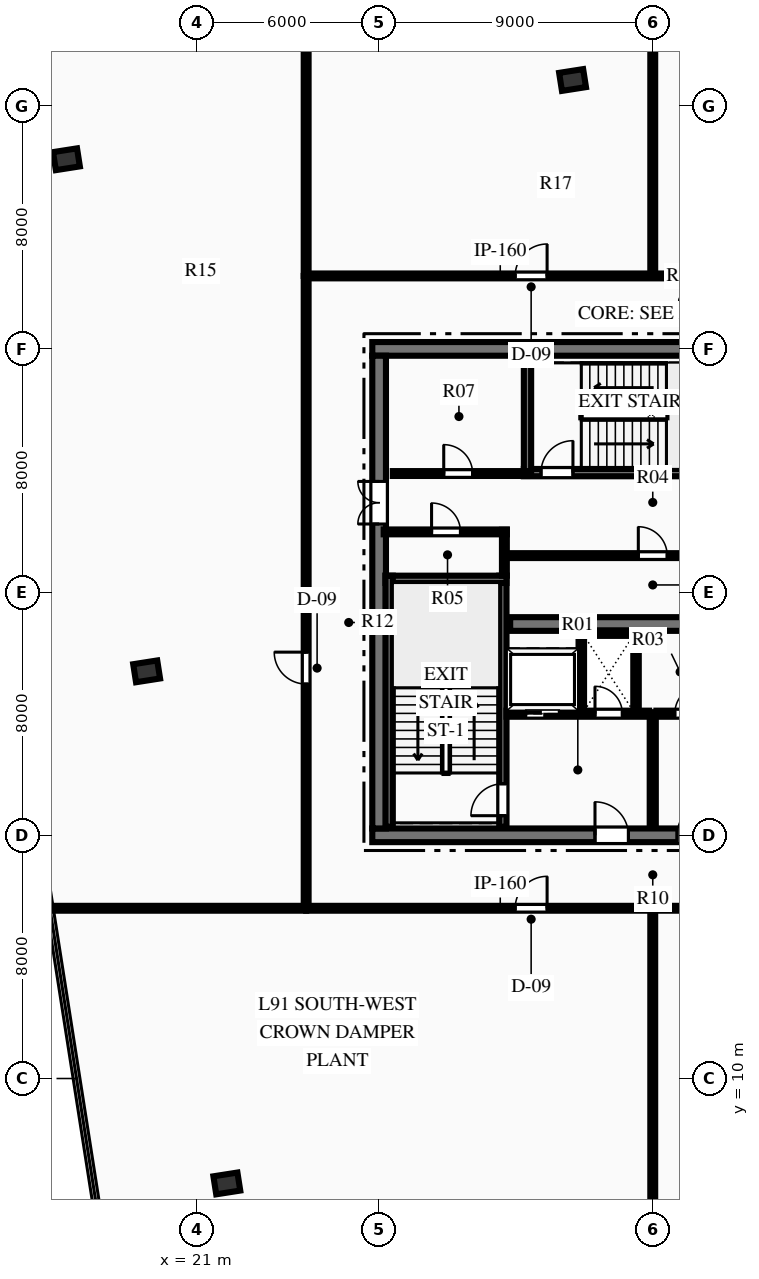
"""IFC4 building model, lengths in metres.
Left out: names, types, materials, properties, quantities, classifications, styles, units other than length and angle.
Written with IfcOpenShell. Run it as: python <this file> out.ifc"""

import sys

from ifc_helpers import new_model, si_unit, direction, frame, frame_2d, origin, origin_2d, place, context, subcontext, project, spatial, rectangle, hollow_rectangle, extrude, element, fill, save


model = new_model("IFC4")
c1 = context("Model", 3, precision=1e-05, world=origin(), true_north=direction((0.0, 1.0)))
c2 = subcontext(c1, "Body", "Model", "MODEL_VIEW")
j1 = project(units=[si_unit("LENGTHUNIT", "METRE"), si_unit("PLANEANGLEUNIT", "RADIAN")], contexts=[c1])
p1 = place(None, origin())
s1 = spatial("IfcSite", under=j1, at=p1, CompositionType="ELEMENT")
p2 = place(p1, origin())
s2 = spatial("IfcBuilding", under=s1, at=p2, CompositionType="ELEMENT")
p3 = place(p2, frame((0.0, 0.0, 360.6)))
s3 = spatial("IfcBuildingStorey", under=s2, at=p3, CompositionType="ELEMENT", Elevation=360.6)
p4 = place(p3, frame((26.775, 18.0, 0.0), z_axis=(0.0, 0.0, 1.0), x_axis=(1.0, 0.0, 0.0)))
e1 = element("IfcWall", 1, at=p4, inside=s3, PredefinedType="SHEAR", context=c2, shape_type="SweptSolid", body=[
    extrude(rectangle(XDim=18.45, YDim=0.45, at=frame_2d((9.225, 0.0))), origin(), (0.0, 0.0, 1.0), 3.6),
])
p5 = place(p4, frame((7.325, 0.0, 0.0)))
e2 = element("IfcOpeningElement", 2, at=p5, cuts=e1, PredefinedType="OPENING", context=c2, shape_type="SweptSolid", body=[
    extrude(rectangle(XDim=1.1, YDim=2.15, at=frame_2d((0.55, 1.075))), frame((0.0, 0.235, 0.0), z_axis=(0.0, -1.0, 0.0), x_axis=(1.0, 0.0, 0.0)), (0.0, 0.0, 1.0), 0.47),
])
p6 = place(p4, frame((10.025, 0.0, 0.0)))
e3 = element("IfcOpeningElement", 3, at=p6, cuts=e1, PredefinedType="OPENING", context=c2, shape_type="SweptSolid", body=[
    extrude(rectangle(XDim=1.1, YDim=2.15, at=frame_2d((0.55, 1.075))), frame((0.0, 0.235, 0.0), z_axis=(0.0, -1.0, 0.0), x_axis=(1.0, 0.0, 0.0)), (0.0, 0.0, 1.0), 0.47),
])
p7 = place(p3, frame((26.775, 34.0, 0.0), z_axis=(0.0, 0.0, 1.0), x_axis=(1.0, 0.0, 0.0)))
e4 = element("IfcWall", 4, at=p7, inside=s3, PredefinedType="SHEAR", context=c2, shape_type="SweptSolid", body=[
    extrude(rectangle(XDim=18.45, YDim=0.45, at=frame_2d((9.225, 0.0))), origin(), (0.0, 0.0, 1.0), 3.6),
])
p8 = place(p3, frame((27.0, 18.225, 0.0), z_axis=(0.0, 0.0, 1.0), x_axis=(0.0, 1.0, 0.0)))
e5 = element("IfcWall", 5, at=p8, inside=s3, PredefinedType="SHEAR", context=c2, shape_type="SweptSolid", body=[
    extrude(rectangle(XDim=15.55, YDim=0.45, at=frame_2d((7.775, 0.0))), origin(), (0.0, 0.0, 1.0), 3.6),
])
p9 = place(p8, frame((10.015, 0.0, 0.0)))
e6 = element("IfcOpeningElement", 6, at=p9, cuts=e5, PredefinedType="OPENING", context=c2, shape_type="SweptSolid", body=[
    extrude(rectangle(XDim=1.4, YDim=2.2, at=frame_2d((0.7, 1.1))), frame((0.0, 0.235, 0.0), z_axis=(0.0, -1.0, 0.0), x_axis=(1.0, 0.0, 0.0)), (0.0, 0.0, 1.0), 0.47),
])
p10 = place(p3, frame((31.31, 24.95, 0.0), z_axis=(0.0, 0.0, 1.0), x_axis=(1.0, 0.0, 0.0)))
e7 = element("IfcWall", 7, at=p10, inside=s3, PredefinedType="SHEAR", context=c2, shape_type="SweptSolid", body=[
    extrude(rectangle(XDim=9.38, YDim=0.45, at=frame_2d((4.69, 0.0))), origin(), (0.0, 0.0, 1.0), 3.6),
])
p11 = place(p3, frame((31.07, 18.28, 0.0), z_axis=(0.0, 0.0, 1.0), x_axis=(0.0, 1.0, 0.0)))
e8 = element("IfcWall", 8, at=p11, inside=s3, PredefinedType="SHEAR", context=c2, shape_type="SweptSolid", body=[
    extrude(rectangle(XDim=8.26, YDim=0.24, at=frame_2d((4.13, 0.0))), origin(), (0.0, 0.0, 1.0), 3.6),
])
p12 = place(p11, frame((0.365, 0.0, 0.0)))
e9 = element("IfcOpeningElement", 9, at=p12, cuts=e8, PredefinedType="OPENING", context=c2, shape_type="SweptSolid", body=[
    extrude(rectangle(XDim=1.05, YDim=2.15, at=frame_2d((0.525, 1.075))), frame((0.0, 0.13, 0.0), z_axis=(0.0, -1.0, 0.0), x_axis=(1.0, 0.0, 0.0)), (0.0, 0.0, 1.0), 0.26),
])
p13 = place(p3, frame((27.21, 26.42, 0.0), z_axis=(0.0, 0.0, 1.0), x_axis=(1.0, 0.0, 0.0)))
e10 = element("IfcWall", 10, at=p13, inside=s3, PredefinedType="SHEAR", context=c2, shape_type="SweptSolid", body=[
    extrude(rectangle(XDim=3.98, YDim=0.24, at=frame_2d((1.99, 0.0))), origin(), (0.0, 0.0, 1.0), 3.6),
])
p14 = place(p3, frame((27.33, 18.28, 0.0), z_axis=(0.0, 0.0, 1.0), x_axis=(0.0, 1.0, 0.0)))
e11 = element("IfcWall", 11, at=p14, inside=s3, PredefinedType="SHEAR", context=c2, shape_type="SweptSolid", body=[
    extrude(rectangle(XDim=8.26, YDim=0.24, at=frame_2d((4.13, 0.0))), origin(), (0.0, 0.0, 1.0), 3.6),
])
p15 = place(p3, frame((31.76, 29.93, 0.0), z_axis=(0.0, 0.0, 1.0), x_axis=(1.0, 0.0, 0.0)))
e12 = element("IfcWall", 12, at=p15, inside=s3, PredefinedType="SHEAR", context=c2, shape_type="SweptSolid", body=[
    extrude(rectangle(XDim=8.38, YDim=0.24, at=frame_2d((4.19, 0.0))), origin(), (0.0, 0.0, 1.0), 3.6),
])
p16 = place(p15, frame((0.565, 0.0, 0.0)))
e13 = element("IfcOpeningElement", 13, at=p16, cuts=e12, PredefinedType="OPENING", context=c2, shape_type="SweptSolid", body=[
    extrude(rectangle(XDim=1.05, YDim=2.15, at=frame_2d((0.525, 1.075))), frame((0.0, 0.13, 0.0), z_axis=(0.0, -1.0, 0.0), x_axis=(1.0, 0.0, 0.0)), (0.0, 0.0, 1.0), 0.26),
])
p17 = place(p3, frame((31.88, 29.93, 0.0), z_axis=(0.0, 0.0, 1.0), x_axis=(0.0, 1.0, 0.0)))
e14 = element("IfcWall", 14, at=p17, inside=s3, PredefinedType="SHEAR", context=c2, shape_type="SweptSolid", body=[
    extrude(rectangle(XDim=3.79, YDim=0.24, at=frame_2d((1.895, 0.0))), origin(), (0.0, 0.0, 1.0), 3.6),
])
for number, where, z_axis, x_axis in (
    (15, (33.362, 42.845, 0.0), (0.0, 0.0, 1.0), (-0.155, 0.988, 0.0)),
    (16, (16.715, 40.238, 0.0), (0.0, 0.0, 1.0), (-0.155, 0.988, 0.0)),
    (17, (19.353, 23.393, 0.0), (0.0, 0.0, 1.0), (-0.155, 0.988, 0.0)),
    (18, (21.991, 6.548, 0.0), (0.0, 0.0, 1.0), (-0.155, 0.988, 0.0)),
):
    element("IfcColumn", number, at=place(p3, frame(where, z_axis=z_axis, x_axis=x_axis)), inside=s3, PredefinedType="COLUMN", context=c2, shape_type="SweptSolid", body=[
        extrude(hollow_rectangle(XDim=0.6, YDim=0.8, WallThickness=0.04, at=origin_2d()), origin(), (0.0, 0.0, 1.0), 3.6),
    ])
p18 = place(p3, frame((36.0, 18.28, 0.0), z_axis=(0.0, 0.0, 1.0), x_axis=(0.0, 1.0, 0.0)))
e19 = element("IfcWall", 19, at=p18, inside=s3, PredefinedType="PARTITIONING", context=c2, shape_type="SweptSolid", body=[
    extrude(rectangle(XDim=3.77, YDim=0.2, at=frame_2d((1.885, 0.0))), origin(), (0.0, 0.0, 1.0), 3.33),
])
p19 = place(p3, frame((31.19, 22.0, 0.0), z_axis=(0.0, 0.0, 1.0), x_axis=(1.0, 0.0, 0.0)))
e20 = element("IfcWall", 20, at=p19, inside=s3, PredefinedType="PARTITIONING", context=c2, shape_type="SweptSolid", body=[
    extrude(rectangle(XDim=4.69, YDim=0.2, at=frame_2d((2.345, 0.0))), origin(), (0.0, 0.0, 1.0), 3.33),
])
p20 = place(p19, frame((2.91, 0.0, 0.0)))
e21 = element("IfcOpeningElement", 21, at=p20, cuts=e20, PredefinedType="OPENING", context=c2, shape_type="SweptSolid", body=[
    extrude(rectangle(XDim=0.9, YDim=2.15, at=frame_2d((0.45, 1.075))), frame((0.0, 0.11, 0.0), z_axis=(0.0, -1.0, 0.0), x_axis=(1.0, 0.0, 0.0)), (0.0, 0.0, 1.0), 0.22),
])
p21 = place(p19, frame((0.635, 0.0, 0.0)))
e22 = element("IfcOpeningElement", 22, at=p21, cuts=e20, PredefinedType="OPENING", context=c2, shape_type="SweptSolid", body=[
    extrude(rectangle(XDim=1.1, YDim=2.15, at=frame_2d((0.55, 1.075))), frame((0.0, 0.11, 0.0), z_axis=(0.0, -1.0, 0.0), x_axis=(1.0, 0.0, 0.0)), (0.0, 0.0, 1.0), 0.22),
])
p22 = place(p3, frame((36.12, 22.0, 0.0), z_axis=(0.0, 0.0, 1.0), x_axis=(1.0, 0.0, 0.0)))
e23 = element("IfcWall", 23, at=p22, inside=s3, PredefinedType="PARTITIONING", context=c2, shape_type="SweptSolid", body=[
    extrude(rectangle(XDim=4.69, YDim=0.2, at=frame_2d((2.345, 0.0))), origin(), (0.0, 0.0, 1.0), 3.33),
])
p23 = place(p22, frame((0.605, 0.0, 0.0)))
e24 = element("IfcOpeningElement", 24, at=p23, cuts=e23, PredefinedType="OPENING", context=c2, shape_type="SweptSolid", body=[
    extrude(rectangle(XDim=0.95, YDim=2.15, at=frame_2d((0.475, 1.075))), frame((0.0, 0.11, 0.0), z_axis=(0.0, -1.0, 0.0), x_axis=(1.0, 0.0, 0.0)), (0.0, 0.0, 1.0), 0.22),
])
p24 = place(p22, frame((2.955, 0.0, 0.0)))
e25 = element("IfcOpeningElement", 25, at=p24, cuts=e23, PredefinedType="OPENING", context=c2, shape_type="SweptSolid", body=[
    extrude(rectangle(XDim=1.1, YDim=2.15, at=frame_2d((0.55, 1.075))), frame((0.0, 0.11, 0.0), z_axis=(0.0, -1.0, 0.0), x_axis=(1.0, 0.0, 0.0)), (0.0, 0.0, 1.0), 0.22),
])
for number, where, z_axis, x_axis in (
    (26, (33.65, 22.05, 0.0), (0.0, 0.0, 1.0), (0.0, 1.0, 0.0)),
    (27, (35.45, 22.05, 0.0), (0.0, 0.0, 1.0), (0.0, 1.0, 0.0)),
):
    element("IfcWall", number, at=place(p3, frame(where, z_axis=z_axis, x_axis=x_axis)), inside=s3, PredefinedType="PARTITIONING", context=c2, shape_type="SweptSolid", body=[
        extrude(rectangle(XDim=2.6, YDim=0.18, at=frame_2d((1.3, 0.0))), origin(), (0.0, 0.0, 1.0), 3.33),
    ])
p25 = place(p3, frame((33.65, 24.65, 0.0), z_axis=(0.0, 0.0, 1.0), x_axis=(1.0, 0.0, 0.0)))
e28 = element("IfcWall", 28, at=p25, inside=s3, PredefinedType="PARTITIONING", context=c2, shape_type="SweptSolid", body=[
    extrude(rectangle(XDim=1.8, YDim=0.18, at=frame_2d((0.9, 0.0))), origin(), (0.0, 0.0, 1.0), 3.33),
])
p26 = place(p3, frame((27.15, 27.98, 0.0), z_axis=(0.0, 0.0, 1.0), x_axis=(1.0, 0.0, 0.0)))
e29 = element("IfcWall", 29, at=p26, inside=s3, PredefinedType="PARTITIONING", context=c2, shape_type="SweptSolid", body=[
    extrude(rectangle(XDim=4.05, YDim=0.16, at=frame_2d((2.025, 0.0))), origin(), (0.0, 0.0, 1.0), 3.33),
])
p27 = place(p26, frame((1.575, 0.0, 0.0)))
e30 = element("IfcOpeningElement", 30, at=p27, cuts=e29, PredefinedType="OPENING", context=c2, shape_type="SweptSolid", body=[
    extrude(rectangle(XDim=0.95, YDim=2.15, at=frame_2d((0.475, 1.075))), frame((0.0, 0.09, 0.0), z_axis=(0.0, -1.0, 0.0), x_axis=(1.0, 0.0, 0.0)), (0.0, 0.0, 1.0), 0.18),
])
p28 = place(p3, frame((31.12, 26.54, 0.0), z_axis=(0.0, 0.0, 1.0), x_axis=(0.0, 1.0, 0.0)))
e31 = element("IfcWall", 31, at=p28, inside=s3, PredefinedType="PARTITIONING", context=c2, shape_type="SweptSolid", body=[
    extrude(rectangle(XDim=1.51, YDim=0.16, at=frame_2d((0.755, 0.0))), origin(), (0.0, 0.0, 1.0), 3.33),
])
p29 = place(p3, frame((27.45, 29.9, 0.0), z_axis=(0.0, 0.0, 1.0), x_axis=(1.0, 0.0, 0.0)))
e32 = element("IfcWall", 32, at=p29, inside=s3, PredefinedType="PARTITIONING", context=c2, shape_type="SweptSolid", body=[
    extrude(rectangle(XDim=4.43, YDim=0.16, at=frame_2d((2.215, 0.0))), origin(), (0.0, 0.0, 1.0), 3.33),
])
p30 = place(p29, frame((1.675, 0.0, 0.0)))
e33 = element("IfcOpeningElement", 33, at=p30, cuts=e32, PredefinedType="OPENING", context=c2, shape_type="SweptSolid", body=[
    extrude(rectangle(XDim=0.95, YDim=2.15, at=frame_2d((0.475, 1.075))), frame((0.0, 0.09, 0.0), z_axis=(0.0, -1.0, 0.0), x_axis=(1.0, 0.0, 0.0)), (0.0, 0.0, 1.0), 0.18),
])
p31 = place(p3, frame((31.2, 27.2, 0.0), z_axis=(0.0, 0.0, 1.0), x_axis=(1.0, 0.0, 0.0)))
e34 = element("IfcWall", 34, at=p31, inside=s3, PredefinedType="PARTITIONING", context=c2, shape_type="SweptSolid", body=[
    extrude(rectangle(XDim=9.6, YDim=0.16, at=frame_2d((4.8, 0.0))), origin(), (0.0, 0.0, 1.0), 3.33),
])
p32 = place(p31, frame((4.325, 0.0, 0.0)))
e35 = element("IfcOpeningElement", 35, at=p32, cuts=e34, PredefinedType="OPENING", context=c2, shape_type="SweptSolid", body=[
    extrude(rectangle(XDim=0.95, YDim=2.15, at=frame_2d((0.475, 1.075))), frame((0.0, 0.09, 0.0), z_axis=(0.0, -1.0, 0.0), x_axis=(1.0, 0.0, 0.0)), (0.0, 0.0, 1.0), 0.18),
])
p33 = place(p3, frame((24.6, 15.6, 0.0), z_axis=(0.0, 0.0, 1.0), x_axis=(1.0, 0.0, 0.0)))
e36 = element("IfcWall", 36, at=p33, inside=s3, PredefinedType="PARTITIONING", context=c2, shape_type="SweptSolid", body=[
    extrude(rectangle(XDim=22.8, YDim=0.16, at=frame_2d((11.4, 0.0))), origin(), (0.0, 0.0, 1.0), 3.33),
])
p34 = place(p33, frame((6.875, 0.0, 0.0)))
e37 = element("IfcOpeningElement", 37, at=p34, cuts=e36, PredefinedType="OPENING", context=c2, shape_type="SweptSolid", body=[
    extrude(rectangle(XDim=1.05, YDim=2.15, at=frame_2d((0.525, 1.075))), frame((0.0, 0.09, 0.0), z_axis=(0.0, -1.0, 0.0), x_axis=(1.0, 0.0, 0.0)), (0.0, 0.0, 1.0), 0.18),
])
p35 = place(p33, frame((14.875, 0.0, 0.0)))
e38 = element("IfcOpeningElement", 38, at=p35, cuts=e36, PredefinedType="OPENING", context=c2, shape_type="SweptSolid", body=[
    extrude(rectangle(XDim=1.05, YDim=2.15, at=frame_2d((0.525, 1.075))), frame((0.0, 0.09, 0.0), z_axis=(0.0, -1.0, 0.0), x_axis=(1.0, 0.0, 0.0)), (0.0, 0.0, 1.0), 0.18),
])
p36 = place(p3, frame((24.6, 36.4, 0.0), z_axis=(0.0, 0.0, 1.0), x_axis=(1.0, 0.0, 0.0)))
e39 = element("IfcWall", 39, at=p36, inside=s3, PredefinedType="PARTITIONING", context=c2, shape_type="SweptSolid", body=[
    extrude(rectangle(XDim=22.8, YDim=0.16, at=frame_2d((11.4, 0.0))), origin(), (0.0, 0.0, 1.0), 3.33),
])
p37 = place(p36, frame((6.875, 0.0, 0.0)))
e40 = element("IfcOpeningElement", 40, at=p37, cuts=e39, PredefinedType="OPENING", context=c2, shape_type="SweptSolid", body=[
    extrude(rectangle(XDim=1.05, YDim=2.15, at=frame_2d((0.525, 1.075))), frame((0.0, 0.09, 0.0), z_axis=(0.0, -1.0, 0.0), x_axis=(1.0, 0.0, 0.0)), (0.0, 0.0, 1.0), 0.18),
])
p38 = place(p36, frame((14.875, 0.0, 0.0)))
e41 = element("IfcOpeningElement", 41, at=p38, cuts=e39, PredefinedType="OPENING", context=c2, shape_type="SweptSolid", body=[
    extrude(rectangle(XDim=1.05, YDim=2.15, at=frame_2d((0.525, 1.075))), frame((0.0, 0.09, 0.0), z_axis=(0.0, -1.0, 0.0), x_axis=(1.0, 0.0, 0.0)), (0.0, 0.0, 1.0), 0.18),
])
p39 = place(p3, frame((24.6, 15.6, 0.0), z_axis=(0.0, 0.0, 1.0), x_axis=(0.0, 1.0, 0.0)))
e42 = element("IfcWall", 42, at=p39, inside=s3, PredefinedType="PARTITIONING", context=c2, shape_type="SweptSolid", body=[
    extrude(rectangle(XDim=20.8, YDim=0.16, at=frame_2d((10.4, 0.0))), origin(), (0.0, 0.0, 1.0), 3.33),
])
p40 = place(p39, frame((7.375, 0.0, 0.0)))
e43 = element("IfcOpeningElement", 43, at=p40, cuts=e42, PredefinedType="OPENING", context=c2, shape_type="SweptSolid", body=[
    extrude(rectangle(XDim=1.05, YDim=2.15, at=frame_2d((0.525, 1.075))), frame((0.0, 0.09, 0.0), z_axis=(0.0, -1.0, 0.0), x_axis=(1.0, 0.0, 0.0)), (0.0, 0.0, 1.0), 0.18),
])
for number, where, z_axis, x_axis in (
    (44, (36.0, 4.38, 0.0), (0.0, 0.0, 1.0), (0.0, 1.0, 0.0)),
    (45, (36.0, 36.4, 0.0), (0.0, 0.0, 1.0), (0.0, 1.0, 0.0)),
):
    element("IfcWall", number, at=place(p3, frame(where, z_axis=z_axis, x_axis=x_axis)), inside=s3, PredefinedType="PARTITIONING", context=c2, shape_type="SweptSolid", body=[
        extrude(rectangle(XDim=11.22, YDim=0.16, at=frame_2d((5.61, 0.0))), origin(), (0.0, 0.0, 1.0), 3.33),
    ])
p41 = place(p3, frame((16.211, 15.6, 0.0), z_axis=(0.0, 0.0, 1.0), x_axis=(1.0, 0.0, 0.0)))
e46 = element("IfcWall", 46, at=p41, inside=s3, PredefinedType="PARTITIONING", context=c2, shape_type="SweptSolid", body=[
    extrude(rectangle(XDim=8.389, YDim=0.16, at=frame_2d((4.195, 0.0))), origin(), (0.0, 0.0, 1.0), 3.33),
])
p42 = place(p3, frame((24.6, 36.4, 0.0), z_axis=(0.0, 0.0, 1.0), x_axis=(0.0, 1.0, 0.0)))
e47 = element("IfcWall", 47, at=p42, inside=s3, PredefinedType="PARTITIONING", context=c2, shape_type="SweptSolid", body=[
    extrude(rectangle(XDim=9.435, YDim=0.16, at=frame_2d((4.718, 0.0))), origin(), (0.0, 0.0, 1.0), 3.33),
])
p43 = place(p23, origin())
e48 = element("IfcDoor", 48, at=p43, inside=s3, OperationType="SINGLE_SWING_RIGHT", PredefinedType="DOOR", context=c2, shape_type="SweptSolid", body=[
    extrude(rectangle(XDim=0.95, YDim=2.15, at=frame_2d((0.475, 1.075))), frame((0.0, 0.025, 0.0), z_axis=(0.0, -1.0, 0.0), x_axis=(1.0, 0.0, 0.0)), (0.0, 0.0, 1.0), 0.05),
])
fill(e24, e48)
p44 = place(p27, origin())
e49 = element("IfcDoor", 49, at=p44, inside=s3, OperationType="SINGLE_SWING_LEFT", PredefinedType="DOOR", context=c2, shape_type="SweptSolid", body=[
    extrude(rectangle(XDim=0.95, YDim=2.15, at=frame_2d((0.475, 1.075))), frame((0.0, 0.025, 0.0), z_axis=(0.0, -1.0, 0.0), x_axis=(1.0, 0.0, 0.0)), (0.0, 0.0, 1.0), 0.05),
])
fill(e30, e49)
p45 = place(p30, origin())
e50 = element("IfcDoor", 50, at=p45, inside=s3, OperationType="SINGLE_SWING_LEFT", PredefinedType="DOOR", context=c2, shape_type="SweptSolid", body=[
    extrude(rectangle(XDim=0.95, YDim=2.15, at=frame_2d((0.475, 1.075))), frame((0.0, 0.025, 0.0), z_axis=(0.0, -1.0, 0.0), x_axis=(1.0, 0.0, 0.0)), (0.0, 0.0, 1.0), 0.05),
])
fill(e33, e50)
p46 = place(p32, origin())
e51 = element("IfcDoor", 51, at=p46, inside=s3, OperationType="SINGLE_SWING_LEFT", PredefinedType="DOOR", context=c2, shape_type="SweptSolid", body=[
    extrude(rectangle(XDim=0.95, YDim=2.15, at=frame_2d((0.475, 1.075))), frame((0.0, 0.025, 0.0), z_axis=(0.0, -1.0, 0.0), x_axis=(1.0, 0.0, 0.0)), (0.0, 0.0, 1.0), 0.05),
])
fill(e35, e51)
p47 = place(p12, origin())
e52 = element("IfcDoor", 52, at=p47, inside=s3, OperationType="SINGLE_SWING_LEFT", PredefinedType="DOOR", context=c2, shape_type="SweptSolid", body=[
    extrude(rectangle(XDim=1.05, YDim=2.15, at=frame_2d((0.525, 1.075))), frame((0.0, 0.025, 0.0), z_axis=(0.0, -1.0, 0.0), x_axis=(1.0, 0.0, 0.0)), (0.0, 0.0, 1.0), 0.05),
])
fill(e9, e52)
p48 = place(p16, origin())
e53 = element("IfcDoor", 53, at=p48, inside=s3, OperationType="SINGLE_SWING_RIGHT", PredefinedType="DOOR", context=c2, shape_type="SweptSolid", body=[
    extrude(rectangle(XDim=1.05, YDim=2.15, at=frame_2d((0.525, 1.075))), frame((0.0, 0.025, 0.0), z_axis=(0.0, -1.0, 0.0), x_axis=(1.0, 0.0, 0.0)), (0.0, 0.0, 1.0), 0.05),
])
fill(e13, e53)
p49 = place(p5, origin())
e54 = element("IfcDoor", 54, at=p49, inside=s3, OperationType="SINGLE_SWING_LEFT", PredefinedType="DOOR", context=c2, shape_type="SweptSolid", body=[
    extrude(rectangle(XDim=1.1, YDim=2.15, at=frame_2d((0.55, 1.075))), frame((0.0, 0.025, 0.0), z_axis=(0.0, -1.0, 0.0), x_axis=(1.0, 0.0, 0.0)), (0.0, 0.0, 1.0), 0.05),
])
fill(e2, e54)
p50 = place(p6, origin())
e55 = element("IfcDoor", 55, at=p50, inside=s3, OperationType="SINGLE_SWING_RIGHT", PredefinedType="DOOR", context=c2, shape_type="SweptSolid", body=[
    extrude(rectangle(XDim=1.1, YDim=2.15, at=frame_2d((0.55, 1.075))), frame((0.0, 0.025, 0.0), z_axis=(0.0, -1.0, 0.0), x_axis=(1.0, 0.0, 0.0)), (0.0, 0.0, 1.0), 0.05),
])
fill(e3, e55)
p51 = place(p20, origin())
e56 = element("IfcDoor", 56, at=p51, inside=s3, OperationType="SINGLE_SWING_LEFT", PredefinedType="DOOR", context=c2, shape_type="SweptSolid", body=[
    extrude(rectangle(XDim=0.9, YDim=2.15, at=frame_2d((0.45, 1.075))), frame((0.0, 0.025, 0.0), z_axis=(0.0, -1.0, 0.0), x_axis=(1.0, 0.0, 0.0)), (0.0, 0.0, 1.0), 0.05),
])
fill(e21, e56)
p52 = place(p9, origin())
e57 = element("IfcDoor", 57, at=p52, inside=s3, OperationType="DOUBLE_DOOR_SINGLE_SWING", PredefinedType="DOOR", context=c2, shape_type="SweptSolid", body=[
    extrude(rectangle(XDim=1.4, YDim=2.2, at=frame_2d((0.7, 1.1))), frame((0.0, 0.025, 0.0), z_axis=(0.0, -1.0, 0.0), x_axis=(1.0, 0.0, 0.0)), (0.0, 0.0, 1.0), 0.05),
])
fill(e6, e57)
p53 = place(p34, origin())
e58 = element("IfcDoor", 58, at=p53, inside=s3, OperationType="SINGLE_SWING_RIGHT", PredefinedType="DOOR", context=c2, shape_type="SweptSolid", body=[
    extrude(rectangle(XDim=1.05, YDim=2.15, at=frame_2d((0.525, 1.075))), frame((0.0, 0.025, 0.0), z_axis=(0.0, -1.0, 0.0), x_axis=(1.0, 0.0, 0.0)), (0.0, 0.0, 1.0), 0.05),
])
fill(e37, e58)
p54 = place(p40, origin())
e59 = element("IfcDoor", 59, at=p54, inside=s3, OperationType="SINGLE_SWING_RIGHT", PredefinedType="DOOR", context=c2, shape_type="SweptSolid", body=[
    extrude(rectangle(XDim=1.05, YDim=2.15, at=frame_2d((0.525, 1.075))), frame((0.0, 0.025, 0.0), z_axis=(0.0, -1.0, 0.0), x_axis=(1.0, 0.0, 0.0)), (0.0, 0.0, 1.0), 0.05),
])
fill(e43, e59)
p55 = place(p37, origin())
e60 = element("IfcDoor", 60, at=p55, inside=s3, OperationType="SINGLE_SWING_RIGHT", PredefinedType="DOOR", context=c2, shape_type="SweptSolid", body=[
    extrude(rectangle(XDim=1.05, YDim=2.15, at=frame_2d((0.525, 1.075))), frame((0.0, 0.025, 0.0), z_axis=(0.0, -1.0, 0.0), x_axis=(1.0, 0.0, 0.0)), (0.0, 0.0, 1.0), 0.05),
])
fill(e40, e60)
p56 = place(p21, origin())
e61 = element("IfcDoor", 61, at=p56, inside=s3, OperationType="SLIDING_TO_LEFT", PredefinedType="DOOR", context=c2, shape_type="SweptSolid", body=[
    extrude(rectangle(XDim=1.1, YDim=2.15, at=frame_2d((0.55, 1.075))), frame((0.0, 0.025, 0.0), z_axis=(0.0, -1.0, 0.0), x_axis=(1.0, 0.0, 0.0)), (0.0, 0.0, 1.0), 0.05),
])
fill(e22, e61)
save(model, sys.argv[1])
